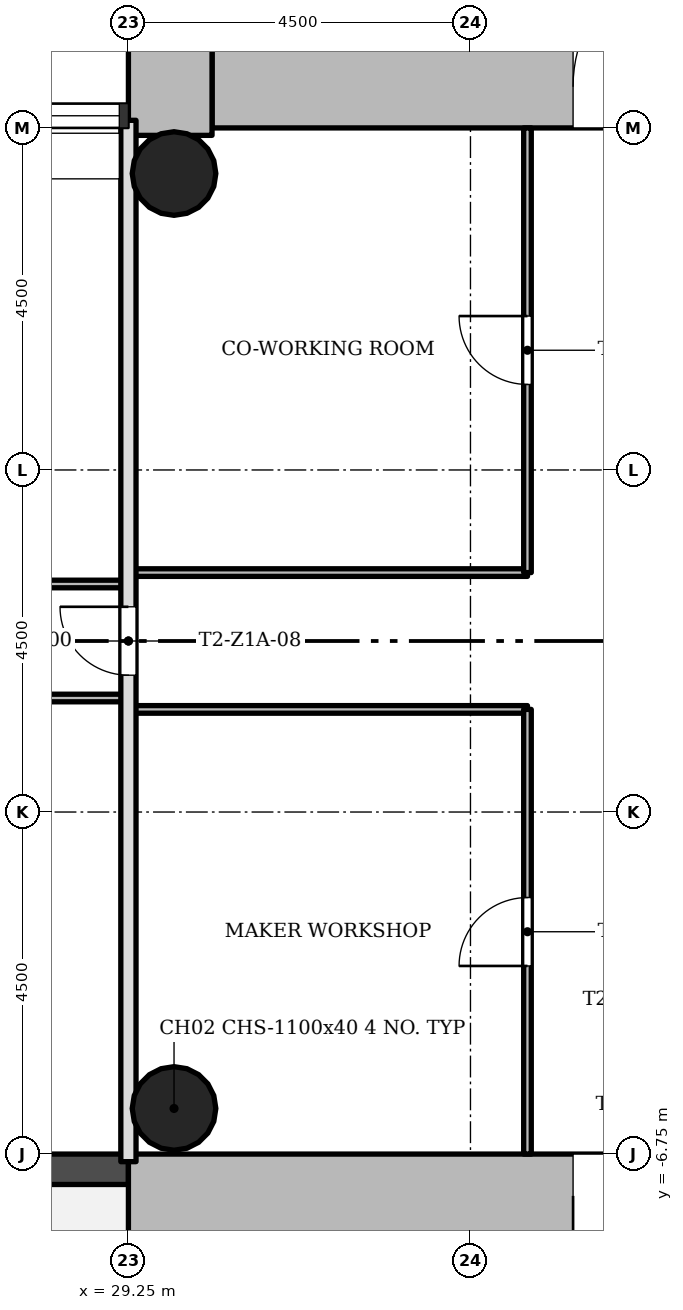
"""IFC4 building model, lengths in metres.
Left out: names, types, materials, properties, quantities, classifications, styles, units other than length and angle.
Written with IfcOpenShell. Run it as: python <this file> out.ifc"""

import sys

from ifc_helpers import new_model, si_unit, direction, frame, frame_2d, origin, origin_2d, place, context, subcontext, project, spatial, rectangle, hollow_circle, extrude, element, fill, save


model = new_model("IFC4")
c1 = context("Model", 3, precision=1e-05, world=origin(), true_north=direction((0.0, 1.0)))
c2 = subcontext(c1, "Body", "Model", "MODEL_VIEW")
j1 = project(units=[si_unit("LENGTHUNIT", "METRE"), si_unit("PLANEANGLEUNIT", "RADIAN")], contexts=[c1])
p1 = place(None, origin())
s1 = spatial("IfcSite", under=j1, at=p1, CompositionType="ELEMENT")
p2 = place(p1, origin())
s2 = spatial("IfcBuilding", under=s1, at=p2, CompositionType="ELEMENT")
p3 = place(p2, frame((0.0, 0.0, 24.5)))
s3 = spatial("IfcBuildingStorey", under=s2, at=p3, CompositionType="ELEMENT", Elevation=24.5)
p4 = place(p3, frame((30.35, 7.3, 0.0), z_axis=(0.0, 0.0, 1.0), x_axis=(1.0, 0.0, 0.0)))
e1 = element("IfcWall", 1, at=p4, inside=s3, PredefinedType="SHEAR", context=c2, shape_type="SweptSolid", body=[
    extrude(rectangle(XDim=12.4, YDim=1.1, at=frame_2d((6.2, 0.0))), origin(), (0.0, 0.0, 1.0), 3.4),
])
p5 = place(p4, frame((4.75, 0.0, 0.0)))
e2 = element("IfcOpeningElement", 2, at=p5, cuts=e1, PredefinedType="OPENING", context=c2, shape_type="SweptSolid", body=[
    extrude(rectangle(XDim=1.8, YDim=2.1, at=frame_2d((0.9, 1.05))), frame((0.0, 0.56, 0.0), z_axis=(0.0, -1.0, 0.0), x_axis=(1.0, 0.0, 0.0)), (0.0, 0.0, 1.0), 1.12),
])
p6 = place(p3, frame((29.8, 15.248, 0.0), z_axis=(0.0, 0.0, 1.0), x_axis=(0.0, -1.0, 0.0)))
e3 = element("IfcWall", 3, at=p6, inside=s3, PredefinedType="SHEAR", context=c2, shape_type="SweptSolid", body=[
    extrude(rectangle(XDim=8.596, YDim=1.1, at=frame_2d((4.298, 0.0))), origin(), (0.0, 0.0, 1.0), 3.4),
])
p7 = place(p3, frame((41.65, -7.3, 0.0), z_axis=(0.0, 0.0, 1.0), x_axis=(-1.0, 0.0, 0.0)))
e4 = element("IfcWall", 4, at=p7, inside=s3, PredefinedType="SHEAR", context=c2, shape_type="SweptSolid", body=[
    extrude(rectangle(XDim=12.4, YDim=1.1, at=frame_2d((6.2, 0.0))), origin(), (0.0, 0.0, 1.0), 3.4),
])
p8 = place(p7, frame((4.75, 0.0, 0.0)))
e5 = element("IfcOpeningElement", 5, at=p8, cuts=e4, PredefinedType="OPENING", context=c2, shape_type="SweptSolid", body=[
    extrude(rectangle(XDim=1.8, YDim=2.1, at=frame_2d((0.9, 1.05))), frame((0.0, 0.56, 0.0), z_axis=(0.0, -1.0, 0.0), x_axis=(1.0, 0.0, 0.0)), (0.0, 0.0, 1.0), 1.12),
])
for number, where, z_axis, x_axis in (
    (6, (29.85, 6.15, 0.0), (0.0, 0.0, 1.0), (1.0, 0.0, 0.0)),
    (7, (29.85, -6.15, 0.0), (0.0, 0.0, 1.0), (1.0, 0.0, 0.0)),
):
    element("IfcColumn", number, at=place(p3, frame(where, z_axis=z_axis, x_axis=x_axis)), inside=s3, PredefinedType="COLUMN", context=c2, shape_type="SweptSolid", body=[
        extrude(hollow_circle(Radius=0.55, WallThickness=0.04, at=origin_2d()), origin(), (0.0, 0.0, 1.0), 3.4),
    ])
p9 = place(p3, frame((24.75, -6.95, 0.0), z_axis=(0.0, 0.0, 1.0), x_axis=(1.0, 0.0, 0.0)))
e8 = element("IfcWall", 8, at=p9, inside=s3, PredefinedType="STANDARD", context=c2, shape_type="SweptSolid", body=[
    extrude(rectangle(XDim=4.5, YDim=0.4, at=frame_2d((2.25, 0.0))), origin(), (0.0, 0.0, 1.0), 3.1),
])
p10 = place(p9, frame((1.35, 0.0, 0.0)))
e9 = element("IfcOpeningElement", 9, at=p10, cuts=e8, PredefinedType="OPENING", context=c2, shape_type="SweptSolid", body=[
    extrude(rectangle(XDim=1.8, YDim=2.1, at=frame_2d((0.9, 1.05))), frame((0.0, 0.21, 0.0), z_axis=(0.0, -1.0, 0.0), x_axis=(1.0, 0.0, 0.0)), (0.0, 0.0, 1.0), 0.42),
])
p11 = place(p3, frame((34.5, -0.9, 0.0), z_axis=(0.0, 0.0, 1.0), x_axis=(-1.0, 0.0, 0.0)))
e10 = element("IfcWall", 10, at=p11, inside=s3, PredefinedType="PARTITIONING", context=c2, shape_type="SweptSolid", body=[
    extrude(rectangle(XDim=5.25, YDim=0.1, at=frame_2d((2.625, 0.0))), origin(), (0.0, 0.0, 1.0), 3.0),
])
p12 = place(p3, frame((29.25, -0.75, 0.0), z_axis=(0.0, 0.0, 1.0), x_axis=(-1.0, 0.0, 0.0)))
e11 = element("IfcWall", 11, at=p12, inside=s3, PredefinedType="PARTITIONING", context=c2, shape_type="SweptSolid", body=[
    extrude(rectangle(XDim=7.8, YDim=0.1, at=frame_2d((3.9, 0.0))), origin(), (0.0, 0.0, 1.0), 3.0),
])
p13 = place(p12, frame((1.8, 0.0, 0.0)))
e12 = element("IfcOpeningElement", 12, at=p13, cuts=e11, PredefinedType="OPENING", context=c2, shape_type="SweptSolid", body=[
    extrude(rectangle(XDim=0.9, YDim=2.1, at=frame_2d((0.45, 1.05))), frame((0.0, 0.06, 0.0), z_axis=(0.0, -1.0, 0.0), x_axis=(1.0, 0.0, 0.0)), (0.0, 0.0, 1.0), 0.12),
])
p14 = place(p12, frame((4.95, 0.0, 0.0)))
e13 = element("IfcOpeningElement", 13, at=p14, cuts=e11, PredefinedType="OPENING", context=c2, shape_type="SweptSolid", body=[
    extrude(rectangle(XDim=0.9, YDim=2.1, at=frame_2d((0.45, 1.05))), frame((0.0, 0.06, 0.0), z_axis=(0.0, -1.0, 0.0), x_axis=(1.0, 0.0, 0.0)), (0.0, 0.0, 1.0), 0.12),
])
p15 = place(p12, frame((6.6, 0.0, 0.0)))
e14 = element("IfcOpeningElement", 14, at=p15, cuts=e11, PredefinedType="OPENING", context=c2, shape_type="SweptSolid", body=[
    extrude(rectangle(XDim=0.9, YDim=2.1, at=frame_2d((0.45, 1.05))), frame((0.0, 0.06, 0.0), z_axis=(0.0, -1.0, 0.0), x_axis=(1.0, 0.0, 0.0)), (0.0, 0.0, 1.0), 0.12),
])
p16 = place(p3, frame((29.25, 0.75, 0.0), z_axis=(0.0, 0.0, 1.0), x_axis=(-1.0, 0.0, 0.0)))
e15 = element("IfcWall", 15, at=p16, inside=s3, PredefinedType="PARTITIONING", context=c2, shape_type="SweptSolid", body=[
    extrude(rectangle(XDim=4.5, YDim=0.1, at=frame_2d((2.25, 0.0))), origin(), (0.0, 0.0, 1.0), 3.0),
])
p17 = place(p16, frame((1.8, 0.0, 0.0)))
e16 = element("IfcOpeningElement", 16, at=p17, cuts=e15, PredefinedType="OPENING", context=c2, shape_type="SweptSolid", body=[
    extrude(rectangle(XDim=0.9, YDim=2.1, at=frame_2d((0.45, 1.05))), frame((0.0, 0.06, 0.0), z_axis=(0.0, -1.0, 0.0), x_axis=(1.0, 0.0, 0.0)), (0.0, 0.0, 1.0), 0.12),
])
p18 = place(p3, frame((34.5, 0.9, 0.0), z_axis=(0.0, 0.0, 1.0), x_axis=(-1.0, 0.0, 0.0)))
e17 = element("IfcWall", 17, at=p18, inside=s3, PredefinedType="PARTITIONING", context=c2, shape_type="SweptSolid", body=[
    extrude(rectangle(XDim=5.25, YDim=0.1, at=frame_2d((2.625, 0.0))), origin(), (0.0, 0.0, 1.0), 3.0),
])
p19 = place(p3, frame((34.5, -6.75, 0.0), z_axis=(0.0, 0.0, 1.0), x_axis=(0.0, 1.0, 0.0)))
e18 = element("IfcWall", 18, at=p19, inside=s3, PredefinedType="PARTITIONING", context=c2, shape_type="SweptSolid", body=[
    extrude(rectangle(XDim=5.85, YDim=0.1, at=frame_2d((2.925, 0.0))), origin(), (0.0, 0.0, 1.0), 3.0),
])
p20 = place(p19, frame((2.475, 0.0, 0.0)))
e19 = element("IfcOpeningElement", 19, at=p20, cuts=e18, PredefinedType="OPENING", context=c2, shape_type="SweptSolid", body=[
    extrude(rectangle(XDim=0.9, YDim=2.1, at=frame_2d((0.45, 1.05))), frame((0.0, 0.06, 0.0), z_axis=(0.0, -1.0, 0.0), x_axis=(1.0, 0.0, 0.0)), (0.0, 0.0, 1.0), 0.12),
])
p21 = place(p3, frame((34.5, 0.9, 0.0), z_axis=(0.0, 0.0, 1.0), x_axis=(0.0, 1.0, 0.0)))
e20 = element("IfcWall", 20, at=p21, inside=s3, PredefinedType="PARTITIONING", context=c2, shape_type="SweptSolid", body=[
    extrude(rectangle(XDim=5.85, YDim=0.1, at=frame_2d((2.925, 0.0))), origin(), (0.0, 0.0, 1.0), 3.0),
])
p22 = place(p21, frame((2.475, 0.0, 0.0)))
e21 = element("IfcOpeningElement", 21, at=p22, cuts=e20, PredefinedType="OPENING", context=c2, shape_type="SweptSolid", body=[
    extrude(rectangle(XDim=0.9, YDim=2.1, at=frame_2d((0.45, 1.05))), frame((0.0, 0.06, 0.0), z_axis=(0.0, -1.0, 0.0), x_axis=(1.0, 0.0, 0.0)), (0.0, 0.0, 1.0), 0.12),
])
p23 = place(p3, frame((29.25, -6.85, 0.0), z_axis=(0.0, 0.0, 1.0), x_axis=(0.0, 1.0, 0.0)))
e22 = element("IfcWall", 22, at=p23, inside=s3, PredefinedType="SOLIDWALL", context=c2, shape_type="SweptSolid", body=[
    extrude(rectangle(XDim=13.7, YDim=0.2, at=frame_2d((6.85, 0.0))), origin(), (0.0, 0.0, 1.0), 3.0),
])
p24 = place(p23, frame((6.4, 0.0, 0.0)))
e23 = element("IfcOpeningElement", 23, at=p24, cuts=e22, PredefinedType="OPENING", context=c2, shape_type="SweptSolid", body=[
    extrude(rectangle(XDim=0.9, YDim=2.1, at=frame_2d((0.45, 1.05))), frame((0.0, 0.11, 0.0), z_axis=(0.0, -1.0, 0.0), x_axis=(1.0, 0.0, 0.0)), (0.0, 0.0, 1.0), 0.22),
])
p25 = place(p22, origin())
e24 = element("IfcDoor", 24, at=p25, inside=s3, OperationType="SINGLE_SWING_LEFT", PredefinedType="DOOR", context=c2, shape_type="SweptSolid", body=[
    extrude(rectangle(XDim=0.9, YDim=2.1, at=frame_2d((0.45, 1.05))), frame((0.0, 0.025, 0.0), z_axis=(0.0, -1.0, 0.0), x_axis=(1.0, 0.0, 0.0)), (0.0, 0.0, 1.0), 0.05),
])
fill(e21, e24)
p26 = place(p20, origin())
e25 = element("IfcDoor", 25, at=p26, inside=s3, OperationType="SINGLE_SWING_RIGHT", PredefinedType="DOOR", context=c2, shape_type="SweptSolid", body=[
    extrude(rectangle(XDim=0.9, YDim=2.1, at=frame_2d((0.45, 1.05))), frame((0.0, 0.025, 0.0), z_axis=(0.0, -1.0, 0.0), x_axis=(1.0, 0.0, 0.0)), (0.0, 0.0, 1.0), 0.05),
])
fill(e19, e25)
p27 = place(p24, origin())
e26 = element("IfcDoor", 26, at=p27, inside=s3, OperationType="SINGLE_SWING_LEFT", PredefinedType="DOOR", context=c2, shape_type="SweptSolid", body=[
    extrude(rectangle(XDim=0.9, YDim=2.1, at=frame_2d((0.45, 1.05))), frame((0.0, 0.025, 0.0), z_axis=(0.0, -1.0, 0.0), x_axis=(1.0, 0.0, 0.0)), (0.0, 0.0, 1.0), 0.05),
])
fill(e23, e26)
p28 = place(p5, origin())
e27 = element("IfcDoor", 27, at=p28, inside=s3, OperationType="SINGLE_SWING_LEFT", PredefinedType="DOOR", context=c2, shape_type="SweptSolid", body=[
    extrude(rectangle(XDim=1.8, YDim=2.1, at=frame_2d((0.9, 1.05))), frame((0.0, 0.025, 0.0), z_axis=(0.0, -1.0, 0.0), x_axis=(1.0, 0.0, 0.0)), (0.0, 0.0, 1.0), 0.05),
])
fill(e2, e27)
p29 = place(p8, origin())
e28 = element("IfcDoor", 28, at=p29, inside=s3, OperationType="SINGLE_SWING_LEFT", PredefinedType="DOOR", context=c2, shape_type="SweptSolid", body=[
    extrude(rectangle(XDim=1.8, YDim=2.1, at=frame_2d((0.9, 1.05))), frame((0.0, 0.025, 0.0), z_axis=(0.0, -1.0, 0.0), x_axis=(1.0, 0.0, 0.0)), (0.0, 0.0, 1.0), 0.05),
])
fill(e5, e28)
save(model, sys.argv[1])
